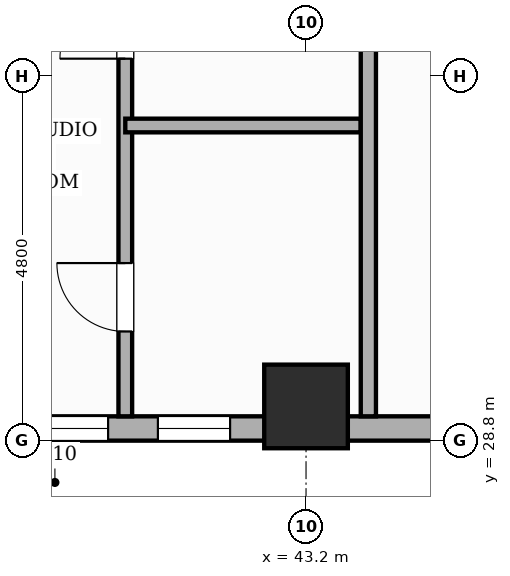
"""IFC4 building model, lengths in metres.
Left out: names, types, materials, properties, quantities, classifications, styles, units other than length and angle.
Written with IfcOpenShell. Run it as: python <this file> out.ifc"""

import sys

from ifc_helpers import new_model, si_unit, direction, frame, frame_2d, origin, origin_2d, place, context, subcontext, project, spatial, rectangle, extrude, element, fill, save


model = new_model("IFC4")
c1 = context("Model", 3, precision=1e-05, world=origin(), true_north=direction((0.0, 1.0)))
c2 = subcontext(c1, "Body", "Model", "MODEL_VIEW")
j1 = project(units=[si_unit("LENGTHUNIT", "METRE"), si_unit("PLANEANGLEUNIT", "RADIAN")], contexts=[c1])
p1 = place(None, origin())
s1 = spatial("IfcSite", under=j1, at=p1, CompositionType="ELEMENT")
p2 = place(p1, origin())
s2 = spatial("IfcBuilding", under=s1, at=p2, CompositionType="ELEMENT")
p3 = place(p2, frame((0.0, 0.0, 46.6)))
s3 = spatial("IfcBuildingStorey", under=s2, at=p3, CompositionType="ELEMENT", Elevation=46.6)
p4 = place(p3, frame((43.2, 29.25, 0.0), z_axis=(0.0, 0.0, 1.0), x_axis=(1.0, 0.0, 0.0)))
e1 = element("IfcColumn", 1, at=p4, inside=s3, PredefinedType="COLUMN", context=c2, shape_type="SweptSolid", body=[
    extrude(rectangle(XDim=1.1, YDim=1.1, at=origin_2d()), origin(), (0.0, 0.0, 1.0), 3.6),
])
p5 = place(p3, frame((55.2, 28.96, 0.0), z_axis=(0.0, 0.0, 1.0), x_axis=(-1.0, 0.0, 0.0)))
e2 = element("IfcWall", 2, at=p5, inside=s3, PredefinedType="STANDARD", context=c2, shape_type="SweptSolid", body=[
    extrude(rectangle(XDim=28.8, YDim=0.32, at=frame_2d((14.4, 0.0))), origin(), (0.0, 0.0, 1.0), 2.53),
])
p6 = place(p5, frame((27.38, 0.0, 0.45)))
e3 = element("IfcOpeningElement", 3, at=p6, cuts=e2, PredefinedType="OPENING", context=c2, shape_type="SweptSolid", body=[
    extrude(rectangle(XDim=0.95, YDim=1.8, at=frame_2d((0.475, 0.9))), frame((0.0, 0.17, 0.0), z_axis=(0.0, -1.0, 0.0), x_axis=(1.0, 0.0, 0.0)), (0.0, 0.0, 1.0), 0.34),
])
p7 = place(p5, frame((18.815, 0.0, 0.65)))
e4 = element("IfcOpeningElement", 4, at=p7, cuts=e2, PredefinedType="OPENING", context=c2, shape_type="SweptSolid", body=[
    extrude(rectangle(XDim=1.4, YDim=1.1, at=frame_2d((0.7, 0.55))), frame((0.0, 0.17, 0.0), z_axis=(0.0, -1.0, 0.0), x_axis=(1.0, 0.0, 0.0)), (0.0, 0.0, 1.0), 0.34),
])
p8 = place(p5, frame((14.604, 0.0, 0.65)))
e5 = element("IfcOpeningElement", 5, at=p8, cuts=e2, PredefinedType="OPENING", context=c2, shape_type="SweptSolid", body=[
    extrude(rectangle(XDim=1.4, YDim=1.1, at=frame_2d((0.7, 0.55))), frame((0.0, 0.17, 0.0), z_axis=(0.0, -1.0, 0.0), x_axis=(1.0, 0.0, 0.0)), (0.0, 0.0, 1.0), 0.34),
])
p9 = place(p5, frame((4.79, 0.0, 0.65)))
e6 = element("IfcOpeningElement", 6, at=p9, cuts=e2, PredefinedType="OPENING", context=c2, shape_type="SweptSolid", body=[
    extrude(rectangle(XDim=1.4, YDim=1.1, at=frame_2d((0.7, 0.55))), frame((0.0, 0.17, 0.0), z_axis=(0.0, -1.0, 0.0), x_axis=(1.0, 0.0, 0.0)), (0.0, 0.0, 1.0), 0.34),
])
p10 = place(p5, frame((0.47, 0.0, 0.65)))
e7 = element("IfcOpeningElement", 7, at=p10, cuts=e2, PredefinedType="OPENING", context=c2, shape_type="SweptSolid", body=[
    extrude(rectangle(XDim=1.4, YDim=1.1, at=frame_2d((0.7, 0.55))), frame((0.0, 0.17, 0.0), z_axis=(0.0, -1.0, 0.0), x_axis=(1.0, 0.0, 0.0)), (0.0, 0.0, 1.0), 0.34),
])
p11 = place(p5, frame((23.76, 0.0, 0.65)))
e8 = element("IfcOpeningElement", 8, at=p11, cuts=e2, PredefinedType="OPENING", context=c2, shape_type="SweptSolid", body=[
    extrude(rectangle(XDim=1.4, YDim=1.1, at=frame_2d((0.7, 0.55))), frame((0.0, 0.17, 0.0), z_axis=(0.0, -1.0, 0.0), x_axis=(1.0, 0.0, 0.0)), (0.0, 0.0, 1.0), 0.34),
])
p12 = place(p5, frame((12.999, 0.0, 0.45)))
e9 = element("IfcOpeningElement", 9, at=p12, cuts=e2, PredefinedType="OPENING", context=c2, shape_type="SweptSolid", body=[
    extrude(rectangle(XDim=0.95, YDim=1.8, at=frame_2d((0.475, 0.9))), frame((0.0, 0.17, 0.0), z_axis=(0.0, -1.0, 0.0), x_axis=(1.0, 0.0, 0.0)), (0.0, 0.0, 1.0), 0.34),
])
p13 = place(p3, frame((40.822, 29.12, 0.0), z_axis=(0.0, 0.0, 1.0), x_axis=(0.0, 1.0, 0.0)))
e10 = element("IfcWall", 10, at=p13, inside=s3, PredefinedType="PLUMBINGWALL", context=c2, shape_type="SweptSolid", body=[
    extrude(rectangle(XDim=6.88, YDim=0.18, at=frame_2d((3.44, 0.0))), origin(), (0.0, 0.0, 1.0), 3.35),
])
p14 = place(p13, frame((1.116, 0.0, 0.0)))
e11 = element("IfcOpeningElement", 11, at=p14, cuts=e10, PredefinedType="OPENING", context=c2, shape_type="SweptSolid", body=[
    extrude(rectangle(XDim=0.9, YDim=2.15, at=frame_2d((0.45, 1.075))), frame((0.0, 0.1, 0.0), z_axis=(0.0, -1.0, 0.0), x_axis=(1.0, 0.0, 0.0)), (0.0, 0.0, 1.0), 0.2),
])
p15 = place(p13, frame((4.705, 0.0, 0.0)))
e12 = element("IfcOpeningElement", 12, at=p15, cuts=e10, PredefinedType="OPENING", context=c2, shape_type="SweptSolid", body=[
    extrude(rectangle(XDim=0.86, YDim=2.1, at=frame_2d((0.43, 1.05))), frame((0.0, 0.1, 0.0), z_axis=(0.0, -1.0, 0.0), x_axis=(1.0, 0.0, 0.0)), (0.0, 0.0, 1.0), 0.2),
])
p16 = place(p3, frame((40.822, 32.946, 0.0), z_axis=(0.0, 0.0, 1.0), x_axis=(1.0, 0.0, 0.0)))
e13 = element("IfcWall", 13, at=p16, inside=s3, PredefinedType="PLUMBINGWALL", context=c2, shape_type="SweptSolid", body=[
    extrude(rectangle(XDim=3.098, YDim=0.18, at=frame_2d((1.549, 0.0))), origin(), (0.0, 0.0, 1.0), 3.35),
])
p17 = place(p3, frame((44.02, 29.12, 0.0), z_axis=(0.0, 0.0, 1.0), x_axis=(0.0, 1.0, 0.0)))
e14 = element("IfcWall", 14, at=p17, inside=s3, PredefinedType="SOLIDWALL", context=c2, shape_type="SweptSolid", body=[
    extrude(rectangle(XDim=6.92, YDim=0.2, at=frame_2d((3.46, 0.0))), origin(), (0.0, 0.0, 1.0), 3.35),
])
p18 = place(p8, origin())
e15 = element("IfcWindow", 15, at=p18, inside=s3, PartitioningType="SINGLE_PANEL", PredefinedType="WINDOW", context=c2, shape_type="SweptSolid", body=[
    extrude(rectangle(XDim=1.4, YDim=1.1, at=frame_2d((0.7, 0.55))), frame((0.0, 0.03, 0.0), z_axis=(0.0, -1.0, 0.0), x_axis=(1.0, 0.0, 0.0)), (0.0, 0.0, 1.0), 0.06),
])
fill(e5, e15)
p19 = place(p12, origin())
e16 = element("IfcWindow", 16, at=p19, inside=s3, PartitioningType="SINGLE_PANEL", PredefinedType="WINDOW", context=c2, shape_type="SweptSolid", body=[
    extrude(rectangle(XDim=0.95, YDim=1.8, at=frame_2d((0.475, 0.9))), frame((0.0, 0.03, 0.0), z_axis=(0.0, -1.0, 0.0), x_axis=(1.0, 0.0, 0.0)), (0.0, 0.0, 1.0), 0.06),
])
fill(e9, e16)
p20 = place(p14, origin())
e17 = element("IfcDoor", 17, at=p20, inside=s3, OperationType="SINGLE_SWING_RIGHT", PredefinedType="DOOR", context=c2, shape_type="SweptSolid", body=[
    extrude(rectangle(XDim=0.9, YDim=2.15, at=frame_2d((0.45, 1.075))), frame((0.0, 0.025, 0.0), z_axis=(0.0, -1.0, 0.0), x_axis=(1.0, 0.0, 0.0)), (0.0, 0.0, 1.0), 0.05),
])
fill(e11, e17)
p21 = place(p15, origin())
e18 = element("IfcDoor", 18, at=p21, inside=s3, OperationType="SINGLE_SWING_LEFT", PredefinedType="DOOR", context=c2, shape_type="SweptSolid", body=[
    extrude(rectangle(XDim=0.86, YDim=2.1, at=frame_2d((0.43, 1.05))), frame((0.0, 0.025, 0.0), z_axis=(0.0, -1.0, 0.0), x_axis=(1.0, 0.0, 0.0)), (0.0, 0.0, 1.0), 0.05),
])
fill(e12, e18)
save(model, sys.argv[1])
